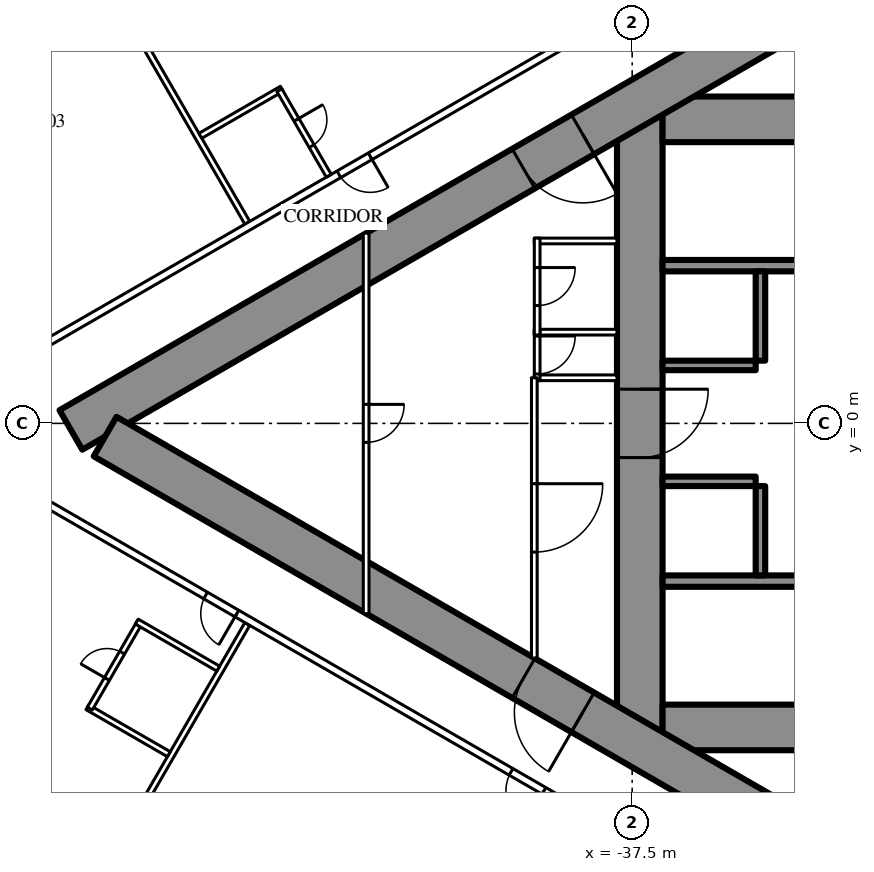
"""IFC4 building model, lengths in metres.
Left out: names, types, materials, properties, quantities, classifications, styles, units other than length and angle.
Written with IfcOpenShell. Run it as: python <this file> out.ifc"""

import sys

from ifc_helpers import new_model, si_unit, direction, frame, frame_2d, origin, place, context, subcontext, project, spatial, rectangle, extrude, element, fill, save


model = new_model("IFC4")
c1 = context("Model", 3, precision=1e-05, world=origin(), true_north=direction((0.0, 1.0)))
c2 = subcontext(c1, "Body", "Model", "MODEL_VIEW")
j1 = project(units=[si_unit("LENGTHUNIT", "METRE"), si_unit("PLANEANGLEUNIT", "RADIAN")], contexts=[c1])
p1 = place(None, origin())
s1 = spatial("IfcSite", under=j1, at=p1, CompositionType="ELEMENT")
p2 = place(p1, origin())
s2 = spatial("IfcBuilding", under=s1, at=p2, CompositionType="ELEMENT")
p3 = place(p2, frame((0.0, 0.0, 56.5)))
s3 = spatial("IfcBuildingStorey", under=s2, at=p3, CompositionType="ELEMENT", Elevation=56.5)
p4 = place(p3, frame((-37.3, 8.6, 0.0), z_axis=(0.0, 0.0, 1.0), x_axis=(0.0, -1.0, 0.0)))
e1 = element("IfcWall", 1, at=p4, inside=s3, PredefinedType="SHEAR", context=c2, shape_type="SweptSolid", body=[
    extrude(rectangle(XDim=17.2, YDim=1.2, at=frame_2d((8.6, 0.0))), origin(), (0.0, 0.0, 1.0), 3.5),
])
p5 = place(p4, frame((7.7, 0.0, 0.0)))
e2 = element("IfcOpeningElement", 2, at=p5, cuts=e1, PredefinedType="OPENING", context=c2, shape_type="SweptSolid", body=[
    extrude(rectangle(XDim=1.8, YDim=2.2, at=frame_2d((0.9, 1.1))), frame((0.0, 0.61, 0.0), z_axis=(0.0, -1.0, 0.0), x_axis=(1.0, 0.0, 0.0)), (0.0, 0.0, 1.0), 1.22),
])
p6 = place(p3, frame((-28.3, 8.0, 0.0), z_axis=(0.0, 0.0, 1.0), x_axis=(-1.0, 0.0, 0.0)))
e3 = element("IfcWall", 3, at=p6, inside=s3, PredefinedType="SHEAR", context=c2, shape_type="SweptSolid", body=[
    extrude(rectangle(XDim=8.4, YDim=1.2, at=frame_2d((4.2, 0.0))), origin(), (0.0, 0.0, 1.0), 3.5),
])
p7 = place(p6, frame((0.25, 0.0, 0.0)))
e4 = element("IfcOpeningElement", 4, at=p7, cuts=e3, PredefinedType="OPENING", context=c2, shape_type="SweptSolid", body=[
    extrude(rectangle(XDim=1.0, YDim=2.2, at=frame_2d((0.5, 1.1))), frame((0.0, 0.61, 0.0), z_axis=(0.0, -1.0, 0.0), x_axis=(1.0, 0.0, 0.0)), (0.0, 0.0, 1.0), 1.22),
])
p8 = place(p3, frame((-28.3, -8.0, 0.0), z_axis=(0.0, 0.0, 1.0), x_axis=(-1.0, 0.0, 0.0)))
e5 = element("IfcWall", 5, at=p8, inside=s3, PredefinedType="SHEAR", context=c2, shape_type="SweptSolid", body=[
    extrude(rectangle(XDim=8.4, YDim=1.2, at=frame_2d((4.2, 0.0))), origin(), (0.0, 0.0, 1.0), 3.5),
])
p9 = place(p8, frame((0.25, 0.0, 0.0)))
e6 = element("IfcOpeningElement", 6, at=p9, cuts=e5, PredefinedType="OPENING", context=c2, shape_type="SweptSolid", body=[
    extrude(rectangle(XDim=1.0, YDim=2.2, at=frame_2d((0.5, 1.1))), frame((0.0, 0.61, 0.0), z_axis=(0.0, -1.0, 0.0), x_axis=(1.0, 0.0, 0.0)), (0.0, 0.0, 1.0), 1.22),
])
for number, where, z_axis, x_axis in (
    (7, (-28.3, 4.15, 0.0), (0.0, 0.0, 1.0), (-1.0, 0.0, 0.0)),
    (8, (-28.3, -4.15, 0.0), (0.0, 0.0, 1.0), (-1.0, 0.0, 0.0)),
):
    element("IfcWall", number, at=place(p3, frame(where, z_axis=z_axis, x_axis=x_axis)), inside=s3, PredefinedType="SHEAR", context=c2, shape_type="SweptSolid", body=[
        extrude(rectangle(XDim=8.4, YDim=0.3, at=frame_2d((4.2, 0.0))), origin(), (0.0, 0.0, 1.0), 3.5),
    ])
p10 = place(p3, frame((-34.125, 4.0, 0.0), z_axis=(0.0, 0.0, 1.0), x_axis=(0.0, -1.0, 0.0)))
e9 = element("IfcWall", 9, at=p10, inside=s3, PredefinedType="SHEAR", context=c2, shape_type="SweptSolid", body=[
    extrude(rectangle(XDim=2.35, YDim=0.25, at=frame_2d((1.175, 0.0))), origin(), (0.0, 0.0, 1.0), 3.5),
])
p11 = place(p3, frame((-34.25, 1.525, 0.0), z_axis=(0.0, 0.0, 1.0), x_axis=(-1.0, 0.0, 0.0)))
e10 = element("IfcWall", 10, at=p11, inside=s3, PredefinedType="SHEAR", context=c2, shape_type="SweptSolid", body=[
    extrude(rectangle(XDim=2.45, YDim=0.25, at=frame_2d((1.225, 0.0))), origin(), (0.0, 0.0, 1.0), 3.5),
])
p12 = place(p3, frame((-34.125, -1.65, 0.0), z_axis=(0.0, 0.0, 1.0), x_axis=(0.0, -1.0, 0.0)))
e11 = element("IfcWall", 11, at=p12, inside=s3, PredefinedType="SHEAR", context=c2, shape_type="SweptSolid", body=[
    extrude(rectangle(XDim=2.35, YDim=0.25, at=frame_2d((1.175, 0.0))), origin(), (0.0, 0.0, 1.0), 3.5),
])
p13 = place(p3, frame((-34.25, -1.525, 0.0), z_axis=(0.0, 0.0, 1.0), x_axis=(-1.0, 0.0, 0.0)))
e12 = element("IfcWall", 12, at=p13, inside=s3, PredefinedType="SHEAR", context=c2, shape_type="SweptSolid", body=[
    extrude(rectangle(XDim=2.45, YDim=0.25, at=frame_2d((1.225, 0.0))), origin(), (0.0, 0.0, 1.0), 3.5),
])
p14 = place(p3, frame((-27.2, 14.3, 0.0), z_axis=(0.0, 0.0, 1.0), x_axis=(-0.866026593062, -0.499997940104, 0.0)))
e13 = element("IfcWall", 13, at=p14, inside=s3, PredefinedType="SHEAR", context=c2, shape_type="SweptSolid", body=[
    extrude(rectangle(XDim=28.946, YDim=1.2, at=frame_2d((14.473, 0.0))), origin(), (0.0, 0.0, 1.0), 3.5),
])
p15 = place(p14, frame((4.6, 0.0, 0.0)))
e14 = element("IfcOpeningElement", 14, at=p15, cuts=e13, PredefinedType="OPENING", context=c2, shape_type="SweptSolid", body=[
    extrude(rectangle(XDim=1.0, YDim=2.2, at=frame_2d((0.5, 1.1))), frame((0.0, 0.61, 0.0), z_axis=(0.0, -1.0, 0.0), x_axis=(1.0, 0.0, 0.0)), (0.0, 0.0, 1.0), 1.22),
])
p16 = place(p14, frame((13.395, 0.0, 0.0)))
e15 = element("IfcOpeningElement", 15, at=p16, cuts=e13, PredefinedType="OPENING", context=c2, shape_type="SweptSolid", body=[
    extrude(rectangle(XDim=1.8, YDim=2.2, at=frame_2d((0.9, 1.1))), frame((0.0, 0.61, 0.0), z_axis=(0.0, -1.0, 0.0), x_axis=(1.0, 0.0, 0.0)), (0.0, 0.0, 1.0), 1.22),
])
p17 = place(p3, frame((-27.2, -14.3, 0.0), z_axis=(0.0, 0.0, 1.0), x_axis=(-0.866024021859, 0.500002393557, 0.0)))
e16 = element("IfcWall", 16, at=p17, inside=s3, PredefinedType="SHEAR", context=c2, shape_type="SweptSolid", body=[
    extrude(rectangle(XDim=27.907, YDim=1.2, at=frame_2d((13.954, 0.0))), origin(), (0.0, 0.0, 1.0), 3.5),
])
p18 = place(p17, frame((4.6, 0.0, 0.0)))
e17 = element("IfcOpeningElement", 17, at=p18, cuts=e16, PredefinedType="OPENING", context=c2, shape_type="SweptSolid", body=[
    extrude(rectangle(XDim=1.0, YDim=2.2, at=frame_2d((0.5, 1.1))), frame((0.0, 0.61, 0.0), z_axis=(0.0, -1.0, 0.0), x_axis=(1.0, 0.0, 0.0)), (0.0, 0.0, 1.0), 1.22),
])
p19 = place(p17, frame((13.395, 0.0, 0.0)))
e18 = element("IfcOpeningElement", 18, at=p19, cuts=e16, PredefinedType="OPENING", context=c2, shape_type="SweptSolid", body=[
    extrude(rectangle(XDim=1.8, YDim=2.2, at=frame_2d((0.9, 1.1))), frame((0.0, 0.61, 0.0), z_axis=(0.0, -1.0, 0.0), x_axis=(1.0, 0.0, 0.0)), (0.0, 0.0, 1.0), 1.22),
])
for number, where, z_axis, x_axis in (
    (19, (-47.627, 5.278, 0.0), (0.0, 0.0, 1.0), (-0.5, 0.866, 0.0)),
    (20, (-47.627, -5.278, 0.0), (0.0, 0.0, 1.0), (-0.5, -0.866, 0.0)),
):
    element("IfcWall", number, at=place(p3, frame(where, z_axis=z_axis, x_axis=x_axis)), inside=s3, PredefinedType="PARTITIONING", context=c2, shape_type="SweptSolid", body=[
        extrude(rectangle(XDim=9.51, YDim=0.15, at=frame_2d((4.755, 0.0))), origin(), (0.0, 0.0, 1.0), 2.25),
    ])
p20 = place(p3, frame((-37.7, 10.894, 0.0), z_axis=(0.0, 0.0, 1.0), x_axis=(-0.866027905338, -0.499995667157, 0.0)))
e21 = element("IfcWall", 21, at=p20, inside=s3, PredefinedType="PARTITIONING", context=c2, shape_type="SweptSolid", body=[
    extrude(rectangle(XDim=21.787, YDim=0.2, at=frame_2d((10.894, 0.0))), origin(), (0.0, 0.0, 1.0), 3.25),
])
p21 = place(p20, frame((20.237, 0.0, 0.0)))
e22 = element("IfcOpeningElement", 22, at=p21, cuts=e21, PredefinedType="OPENING", context=c2, shape_type="SweptSolid", body=[
    extrude(rectangle(XDim=0.95, YDim=2.2, at=frame_2d((0.475, 1.1))), frame((0.0, 0.11, 0.0), z_axis=(0.0, -1.0, 0.0), x_axis=(1.0, 0.0, 0.0)), (0.0, 0.0, 1.0), 0.22),
])
p22 = place(p20, frame((7.73, 0.0, 0.0)))
e23 = element("IfcOpeningElement", 23, at=p22, cuts=e21, PredefinedType="OPENING", context=c2, shape_type="SweptSolid", body=[
    extrude(rectangle(XDim=0.95, YDim=2.2, at=frame_2d((0.475, 1.1))), frame((0.0, 0.11, 0.0), z_axis=(0.0, -1.0, 0.0), x_axis=(1.0, 0.0, 0.0)), (0.0, 0.0, 1.0), 0.22),
])
p23 = place(p3, frame((-36.92, -11.344, 0.0), z_axis=(0.0, 0.0, 1.0), x_axis=(-0.866028313256, 0.499994960614, 0.0)))
e24 = element("IfcWall", 24, at=p23, inside=s3, PredefinedType="PARTITIONING", context=c2, shape_type="SweptSolid", body=[
    extrude(rectangle(XDim=22.568, YDim=0.2, at=frame_2d((11.284, 0.0))), origin(), (0.0, 0.0, 1.0), 3.25),
])
p24 = place(p23, frame((12.68, 0.0, 0.0)))
e25 = element("IfcOpeningElement", 25, at=p24, cuts=e24, PredefinedType="OPENING", context=c2, shape_type="SweptSolid", body=[
    extrude(rectangle(XDim=0.95, YDim=2.2, at=frame_2d((0.475, 1.1))), frame((0.0, 0.11, 0.0), z_axis=(0.0, -1.0, 0.0), x_axis=(1.0, 0.0, 0.0)), (0.0, 0.0, 1.0), 0.22),
])
p25 = place(p23, frame((3.35, 0.0, 0.0)))
e26 = element("IfcOpeningElement", 26, at=p25, cuts=e24, PredefinedType="OPENING", context=c2, shape_type="SweptSolid", body=[
    extrude(rectangle(XDim=1.0, YDim=2.2, at=frame_2d((0.5, 1.1))), frame((0.0, 0.11, 0.0), z_axis=(0.0, -1.0, 0.0), x_axis=(1.0, 0.0, 0.0)), (0.0, 0.0, 1.0), 0.22),
])
p26 = place(p3, frame((-49.692, -8.704, 0.0), z_axis=(0.0, 0.0, 1.0), x_axis=(-0.866073894602, 0.499916002032, 0.0)))
e27 = element("IfcWall", 27, at=p26, inside=s3, PredefinedType="PARTITIONING", context=c2, shape_type="SweptSolid", body=[
    extrude(rectangle(XDim=2.475, YDim=0.15, at=frame_2d((1.238, 0.0))), origin(), (0.0, 0.0, 1.0), 3.25),
])
p27 = place(p3, frame((-50.47, -5.253, 0.0), z_axis=(0.0, 0.0, 1.0), x_axis=(-0.500006934395, -0.866021400173, 0.0)))
e28 = element("IfcWall", 28, at=p27, inside=s3, PredefinedType="PARTITIONING", context=c2, shape_type="SweptSolid", body=[
    extrude(rectangle(XDim=2.6, YDim=0.15, at=frame_2d((1.3, 0.0))), origin(), (0.0, 0.0, 1.0), 3.25),
])
p28 = place(p27, frame((0.9, 0.0, 0.0)))
e29 = element("IfcOpeningElement", 29, at=p28, cuts=e28, PredefinedType="OPENING", context=c2, shape_type="SweptSolid", body=[
    extrude(rectangle(XDim=0.8, YDim=2.2, at=frame_2d((0.4, 1.1))), frame((0.0, 0.085, 0.0), z_axis=(0.0, -1.0, 0.0), x_axis=(1.0, 0.0, 0.0)), (0.0, 0.0, 1.0), 0.17),
])
for number, where, z_axis, x_axis in (
    (30, (-48.392, -6.453, 0.0), (0.0, 0.0, 1.0), (-0.866, 0.5, 0.0)),
    (31, (-46.719, 8.804, 0.0), (0.0, 0.0, 1.0), (-0.866, -0.5, 0.0)),
):
    element("IfcWall", number, at=place(p3, frame(where, z_axis=z_axis, x_axis=x_axis)), inside=s3, PredefinedType="PARTITIONING", context=c2, shape_type="SweptSolid", body=[
        extrude(rectangle(XDim=2.475, YDim=0.15, at=frame_2d((1.237, 0.0))), origin(), (0.0, 0.0, 1.0), 3.25),
    ])
p29 = place(p3, frame((-45.483, 6.515, 0.0), z_axis=(0.0, 0.0, 1.0), x_axis=(-0.500006934395, 0.866021400173, 0.0)))
e32 = element("IfcWall", 32, at=p29, inside=s3, PredefinedType="PARTITIONING", context=c2, shape_type="SweptSolid", body=[
    extrude(rectangle(XDim=2.6, YDim=0.15, at=frame_2d((1.3, 0.0))), origin(), (0.0, 0.0, 1.0), 3.25),
])
p30 = place(p29, frame((0.9, 0.0, 0.0)))
e33 = element("IfcOpeningElement", 33, at=p30, cuts=e32, PredefinedType="OPENING", context=c2, shape_type="SweptSolid", body=[
    extrude(rectangle(XDim=0.8, YDim=2.2, at=frame_2d((0.4, 1.1))), frame((0.0, 0.085, 0.0), z_axis=(0.0, -1.0, 0.0), x_axis=(1.0, 0.0, 0.0)), (0.0, 0.0, 1.0), 0.17),
])
for number, where, z_axis, x_axis in (
    (34, (-37.9, 1.2, 0.0), (0.0, 0.0, 1.0), (-1.0, 0.0, 0.0)),
    (35, (-37.9, 2.4, 0.0), (0.0, 0.0, 1.0), (-1.0, 0.0, 0.0)),
    (36, (-37.9, 4.8, 0.0), (0.0, 0.0, 1.0), (-1.0, 0.0, 0.0)),
):
    element("IfcWall", number, at=place(p3, frame(where, z_axis=z_axis, x_axis=x_axis)), inside=s3, PredefinedType="PARTITIONING", context=c2, shape_type="SweptSolid", body=[
        extrude(rectangle(XDim=2.175, YDim=0.15, at=frame_2d((1.087, 0.0))), origin(), (0.0, 0.0, 1.0), 3.25),
    ])
p31 = place(p3, frame((-40.0, 2.475, 0.0), z_axis=(0.0, 0.0, 1.0), x_axis=(0.0, -1.0, 0.0)))
e37 = element("IfcWall", 37, at=p31, inside=s3, PredefinedType="PARTITIONING", context=c2, shape_type="SweptSolid", body=[
    extrude(rectangle(XDim=1.35, YDim=0.15, at=frame_2d((0.675, 0.0))), origin(), (0.0, 0.0, 1.0), 3.25),
])
p32 = place(p31, frame((0.175, 0.0, 0.0)))
e38 = element("IfcOpeningElement", 38, at=p32, cuts=e37, PredefinedType="OPENING", context=c2, shape_type="SweptSolid", body=[
    extrude(rectangle(XDim=1.0, YDim=2.2, at=frame_2d((0.5, 1.1))), frame((0.0, 0.085, 0.0), z_axis=(0.0, -1.0, 0.0), x_axis=(1.0, 0.0, 0.0)), (0.0, 0.0, 1.0), 0.17),
])
p33 = place(p3, frame((-40.0, 4.875, 0.0), z_axis=(0.0, 0.0, 1.0), x_axis=(0.0, -1.0, 0.0)))
e39 = element("IfcWall", 39, at=p33, inside=s3, PredefinedType="PARTITIONING", context=c2, shape_type="SweptSolid", body=[
    extrude(rectangle(XDim=2.55, YDim=0.15, at=frame_2d((1.275, 0.0))), origin(), (0.0, 0.0, 1.0), 3.25),
])
p34 = place(p33, frame((0.775, 0.0, 0.0)))
e40 = element("IfcOpeningElement", 40, at=p34, cuts=e39, PredefinedType="OPENING", context=c2, shape_type="SweptSolid", body=[
    extrude(rectangle(XDim=1.0, YDim=2.2, at=frame_2d((0.5, 1.1))), frame((0.0, 0.085, 0.0), z_axis=(0.0, -1.0, 0.0), x_axis=(1.0, 0.0, 0.0)), (0.0, 0.0, 1.0), 0.17),
])
p35 = place(p3, frame((-40.075, 1.2, 0.0), z_axis=(0.0, 0.0, 1.0), x_axis=(0.0, -1.0, 0.0)))
e41 = element("IfcWall", 41, at=p35, inside=s3, PredefinedType="PARTITIONING", context=c2, shape_type="SweptSolid", body=[
    extrude(rectangle(XDim=7.374, YDim=0.15, at=frame_2d((3.687, 0.0))), origin(), (0.0, 0.0, 1.0), 3.25),
])
p36 = place(p35, frame((2.787, 0.0, 0.0)))
e42 = element("IfcOpeningElement", 42, at=p36, cuts=e41, PredefinedType="OPENING", context=c2, shape_type="SweptSolid", body=[
    extrude(rectangle(XDim=1.8, YDim=2.2, at=frame_2d((0.9, 1.1))), frame((0.0, 0.085, 0.0), z_axis=(0.0, -1.0, 0.0), x_axis=(1.0, 0.0, 0.0)), (0.0, 0.0, 1.0), 0.17),
])
p37 = place(p3, frame((-44.5, 5.005, 0.0), z_axis=(0.0, 0.0, 1.0), x_axis=(0.0, -1.0, 0.0)))
e43 = element("IfcWall", 43, at=p37, inside=s3, PredefinedType="PARTITIONING", context=c2, shape_type="SweptSolid", body=[
    extrude(rectangle(XDim=10.009, YDim=0.15, at=frame_2d((5.005, 0.0))), origin(), (0.0, 0.0, 1.0), 2.45),
])
p38 = place(p37, frame((4.505, 0.0, 0.0)))
e44 = element("IfcOpeningElement", 44, at=p38, cuts=e43, PredefinedType="OPENING", context=c2, shape_type="SweptSolid", body=[
    extrude(rectangle(XDim=1.0, YDim=2.2, at=frame_2d((0.5, 1.1))), frame((0.0, 0.085, 0.0), z_axis=(0.0, -1.0, 0.0), x_axis=(1.0, 0.0, 0.0)), (0.0, 0.0, 1.0), 0.17),
])
p39 = place(p28, origin())
e45 = element("IfcDoor", 45, at=p39, inside=s3, OperationType="SINGLE_SWING_RIGHT", PredefinedType="DOOR", context=c2, shape_type="SweptSolid", body=[
    extrude(rectangle(XDim=0.8, YDim=2.2, at=frame_2d((0.4, 1.1))), frame((0.0, 0.025, 0.0), z_axis=(0.0, -1.0, 0.0), x_axis=(1.0, 0.0, 0.0)), (0.0, 0.0, 1.0), 0.05),
])
fill(e29, e45)
p40 = place(p24, origin())
e46 = element("IfcDoor", 46, at=p40, inside=s3, OperationType="SINGLE_SWING_LEFT", PredefinedType="DOOR", context=c2, shape_type="SweptSolid", body=[
    extrude(rectangle(XDim=0.95, YDim=2.2, at=frame_2d((0.475, 1.1))), frame((0.0, 0.025, 0.0), z_axis=(0.0, -1.0, 0.0), x_axis=(1.0, 0.0, 0.0)), (0.0, 0.0, 1.0), 0.05),
])
fill(e25, e46)
p41 = place(p25, origin())
e47 = element("IfcDoor", 47, at=p41, inside=s3, OperationType="SINGLE_SWING_LEFT", PredefinedType="DOOR", context=c2, shape_type="SweptSolid", body=[
    extrude(rectangle(XDim=1.0, YDim=2.2, at=frame_2d((0.5, 1.1))), frame((0.0, 0.025, 0.0), z_axis=(0.0, -1.0, 0.0), x_axis=(1.0, 0.0, 0.0)), (0.0, 0.0, 1.0), 0.05),
])
fill(e26, e47)
p42 = place(p30, origin())
e48 = element("IfcDoor", 48, at=p42, inside=s3, OperationType="SINGLE_SWING_RIGHT", PredefinedType="DOOR", context=c2, shape_type="SweptSolid", body=[
    extrude(rectangle(XDim=0.8, YDim=2.2, at=frame_2d((0.4, 1.1))), frame((0.0, 0.025, 0.0), z_axis=(0.0, -1.0, 0.0), x_axis=(1.0, 0.0, 0.0)), (0.0, 0.0, 1.0), 0.05),
])
fill(e33, e48)
p43 = place(p22, origin())
e49 = element("IfcDoor", 49, at=p43, inside=s3, OperationType="SINGLE_SWING_LEFT", PredefinedType="DOOR", context=c2, shape_type="SweptSolid", body=[
    extrude(rectangle(XDim=0.95, YDim=2.2, at=frame_2d((0.475, 1.1))), frame((0.0, 0.025, 0.0), z_axis=(0.0, -1.0, 0.0), x_axis=(1.0, 0.0, 0.0)), (0.0, 0.0, 1.0), 0.05),
])
fill(e23, e49)
p44 = place(p32, origin())
e50 = element("IfcDoor", 50, at=p44, inside=s3, OperationType="SINGLE_SWING_LEFT", PredefinedType="DOOR", context=c2, shape_type="SweptSolid", body=[
    extrude(rectangle(XDim=1.0, YDim=2.2, at=frame_2d((0.5, 1.1))), frame((0.0, 0.025, 0.0), z_axis=(0.0, -1.0, 0.0), x_axis=(1.0, 0.0, 0.0)), (0.0, 0.0, 1.0), 0.05),
])
fill(e38, e50)
p45 = place(p34, origin())
e51 = element("IfcDoor", 51, at=p45, inside=s3, OperationType="SINGLE_SWING_LEFT", PredefinedType="DOOR", context=c2, shape_type="SweptSolid", body=[
    extrude(rectangle(XDim=1.0, YDim=2.2, at=frame_2d((0.5, 1.1))), frame((0.0, 0.025, 0.0), z_axis=(0.0, -1.0, 0.0), x_axis=(1.0, 0.0, 0.0)), (0.0, 0.0, 1.0), 0.05),
])
fill(e40, e51)
p46 = place(p36, origin())
e52 = element("IfcDoor", 52, at=p46, inside=s3, OperationType="DOUBLE_DOOR_SINGLE_SWING", PredefinedType="DOOR", context=c2, shape_type="SweptSolid", body=[
    extrude(rectangle(XDim=1.8, YDim=2.2, at=frame_2d((0.9, 1.1))), frame((0.0, 0.025, 0.0), z_axis=(0.0, -1.0, 0.0), x_axis=(1.0, 0.0, 0.0)), (0.0, 0.0, 1.0), 0.05),
])
fill(e42, e52)
p47 = place(p38, origin())
e53 = element("IfcDoor", 53, at=p47, inside=s3, OperationType="SINGLE_SWING_LEFT", PredefinedType="DOOR", context=c2, shape_type="SweptSolid", body=[
    extrude(rectangle(XDim=1.0, YDim=2.2, at=frame_2d((0.5, 1.1))), frame((0.0, 0.025, 0.0), z_axis=(0.0, -1.0, 0.0), x_axis=(1.0, 0.0, 0.0)), (0.0, 0.0, 1.0), 0.05),
])
fill(e44, e53)
p48 = place(p16, origin())
e54 = element("IfcDoor", 54, at=p48, inside=s3, OperationType="DOUBLE_DOOR_SINGLE_SWING", PredefinedType="DOOR", context=c2, shape_type="SweptSolid", body=[
    extrude(rectangle(XDim=1.8, YDim=2.2, at=frame_2d((0.9, 1.1))), frame((0.0, 0.025, 0.0), z_axis=(0.0, -1.0, 0.0), x_axis=(1.0, 0.0, 0.0)), (0.0, 0.0, 1.0), 0.05),
])
fill(e15, e54)
p49 = place(p19, origin())
e55 = element("IfcDoor", 55, at=p49, inside=s3, OperationType="DOUBLE_DOOR_SINGLE_SWING", PredefinedType="DOOR", context=c2, shape_type="SweptSolid", body=[
    extrude(rectangle(XDim=1.8, YDim=2.2, at=frame_2d((0.9, 1.1))), frame((0.0, 0.025, 0.0), z_axis=(0.0, -1.0, 0.0), x_axis=(1.0, 0.0, 0.0)), (0.0, 0.0, 1.0), 0.05),
])
fill(e18, e55)
p50 = place(p5, origin())
e56 = element("IfcDoor", 56, at=p50, inside=s3, OperationType="DOUBLE_DOOR_SINGLE_SWING", PredefinedType="DOOR", context=c2, shape_type="SweptSolid", body=[
    extrude(rectangle(XDim=1.8, YDim=2.2, at=frame_2d((0.9, 1.1))), frame((0.0, 0.025, 0.0), z_axis=(0.0, -1.0, 0.0), x_axis=(1.0, 0.0, 0.0)), (0.0, 0.0, 1.0), 0.05),
])
fill(e2, e56)
save(model, sys.argv[1])
